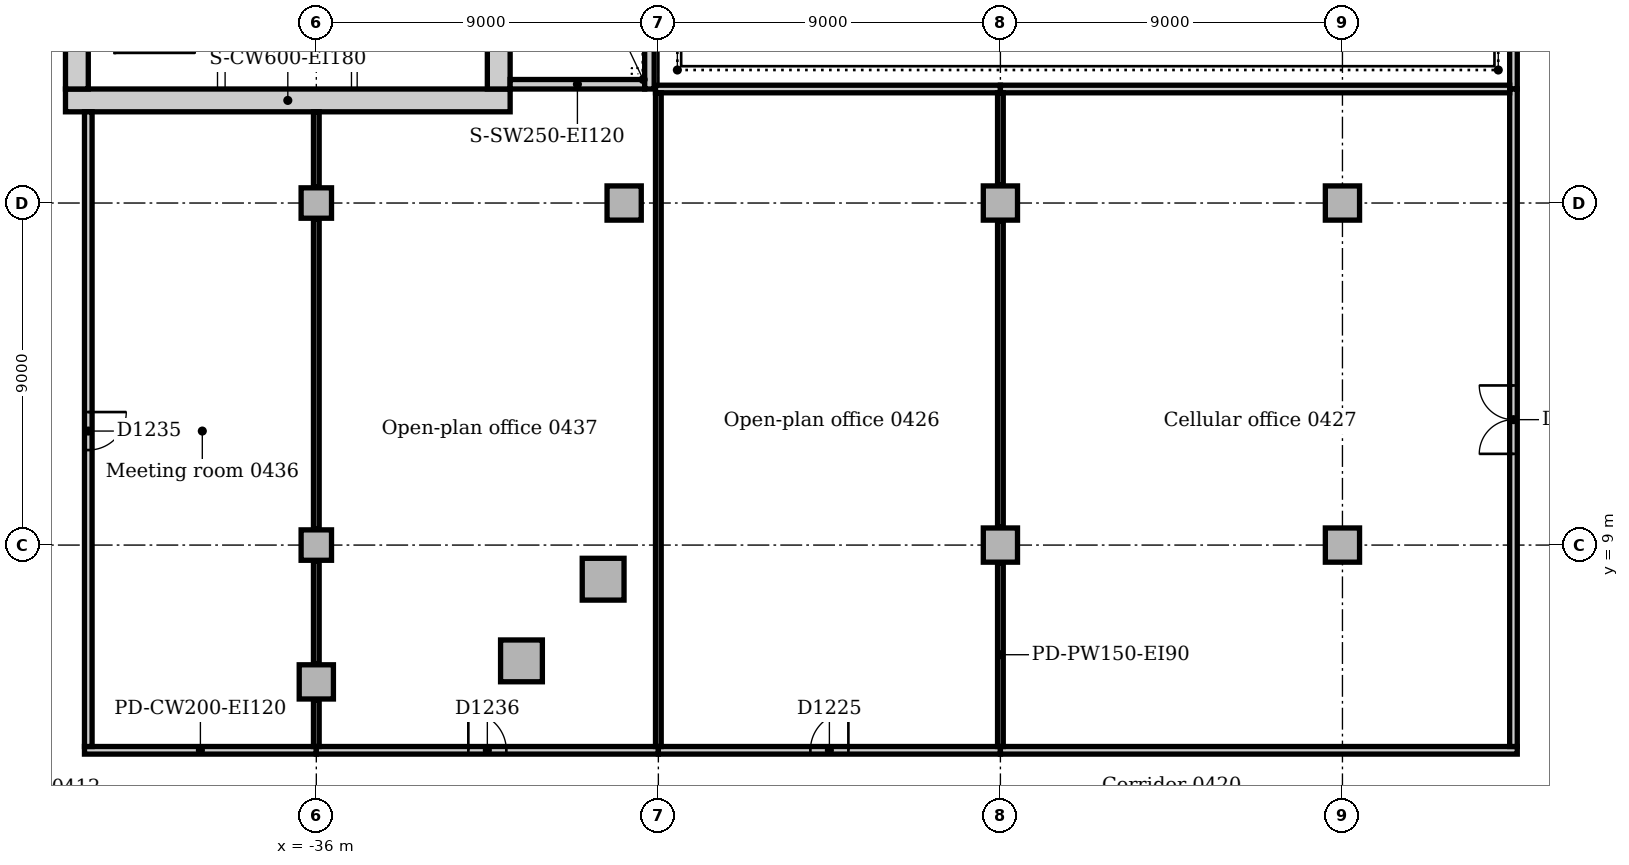
"""IFC4 building model, lengths in metres.
Left out: names, types, materials, properties, quantities, classifications, styles, units other than length and angle.
Written with IfcOpenShell. Run it as: python <this file> out.ifc"""

import sys

from ifc_helpers import new_model, si_unit, direction, frame, frame_2d, origin, origin_2d, place, context, subcontext, project, spatial, rectangle, extrude, element, fill, save


model = new_model("IFC4")
c1 = context("Model", 3, precision=1e-05, world=origin(), true_north=direction((0.0, 1.0)))
c2 = subcontext(c1, "Body", "Model", "MODEL_VIEW")
j1 = project(units=[si_unit("LENGTHUNIT", "METRE"), si_unit("PLANEANGLEUNIT", "RADIAN")], contexts=[c1])
p1 = place(None, origin())
s1 = spatial("IfcSite", under=j1, at=p1, CompositionType="ELEMENT")
p2 = place(p1, origin())
s2 = spatial("IfcBuilding", under=s1, at=p2, CompositionType="ELEMENT")
p3 = place(p2, frame((0.0, 0.0, 21.0)))
s3 = spatial("IfcBuildingStorey", under=s2, at=p3, CompositionType="ELEMENT", Elevation=21.0)
p4 = place(p3, frame((-42.6, 20.7, 0.0), z_axis=(0.0, 0.0, 1.0), x_axis=(1.0, 0.0, 0.0)))
e1 = element("IfcWall", 1, at=p4, inside=s3, PredefinedType="SOLIDWALL", context=c2, shape_type="SweptSolid", body=[
    extrude(rectangle(XDim=11.7, YDim=0.6, at=frame_2d((5.85, 0.0))), origin(), (0.0, 0.0, 1.0), 5.0),
])
p5 = place(p3, frame((-31.2, 21.0, 0.0), z_axis=(0.0, 0.0, 1.0), x_axis=(0.0, 1.0, 0.0)))
e2 = element("IfcWall", 2, at=p5, inside=s3, PredefinedType="SOLIDWALL", context=c2, shape_type="SweptSolid", body=[
    extrude(rectangle(XDim=9.5, YDim=0.6, at=frame_2d((4.75, 0.0))), origin(), (0.0, 0.0, 1.0), 5.0),
])
p6 = place(p5, frame((5.25, 0.0, 0.0)))
e3 = element("IfcOpeningElement", 3, at=p6, cuts=e2, PredefinedType="OPENING", context=c2, shape_type="SweptSolid", body=[
    extrude(rectangle(XDim=1.0, YDim=2.1, at=frame_2d((0.5, 1.05))), frame((0.0, 0.31, 0.0), z_axis=(0.0, -1.0, 0.0), x_axis=(1.0, 0.0, 0.0)), (0.0, 0.0, 1.0), 0.62),
])
p7 = place(p3, frame((-42.3, 30.5, 0.0), z_axis=(0.0, 0.0, 1.0), x_axis=(0.0, -1.0, 0.0)))
e4 = element("IfcWall", 4, at=p7, inside=s3, PredefinedType="SOLIDWALL", context=c2, shape_type="SweptSolid", body=[
    extrude(rectangle(XDim=9.5, YDim=0.6, at=frame_2d((4.75, 0.0))), origin(), (0.0, 0.0, 1.0), 5.0),
])
p8 = place(p7, frame((3.85, 0.0, 0.0)))
e5 = element("IfcOpeningElement", 5, at=p8, cuts=e4, PredefinedType="OPENING", context=c2, shape_type="SweptSolid", body=[
    extrude(rectangle(XDim=1.8, YDim=2.1, at=frame_2d((0.9, 1.05))), frame((0.0, 0.31, 0.0), z_axis=(0.0, -1.0, 0.0), x_axis=(1.0, 0.0, 0.0)), (0.0, 0.0, 1.0), 0.62),
])
p9 = place(p3, frame((-30.9, 21.125, 0.0), z_axis=(0.0, 0.0, 1.0), x_axis=(1.0, 0.0, 0.0)))
e6 = element("IfcWall", 6, at=p9, inside=s3, PredefinedType="SOLIDWALL", context=c2, shape_type="SweptSolid", body=[
    extrude(rectangle(XDim=3.54, YDim=0.25, at=frame_2d((1.77, 0.0))), origin(), (0.0, 0.0, 1.0), 5.0),
])
p10 = place(p3, frame((-27.235, 21.0, 0.0), z_axis=(0.0, 0.0, 1.0), x_axis=(0.0, 1.0, 0.0)))
e7 = element("IfcWall", 7, at=p10, inside=s3, PredefinedType="SOLIDWALL", context=c2, shape_type="SweptSolid", body=[
    extrude(rectangle(XDim=6.65, YDim=0.25, at=frame_2d((3.325, 0.0))), origin(), (0.0, 0.0, 1.0), 5.0),
])
for number, where, z_axis, x_axis in (
    (8, (-30.602, 5.953, 0.0), (0.0, 0.0, 1.0), (1.0, 0.0, 0.0)),
    (9, (-28.453, 8.102, 0.0), (0.0, 0.0, 1.0), (1.0, 0.0, 0.0)),
):
    element("IfcColumn", number, at=place(p3, frame(where, z_axis=z_axis, x_axis=x_axis)), inside=s3, PredefinedType="COLUMN", context=c2, shape_type="SweptSolid", body=[
        extrude(rectangle(XDim=1.1, YDim=1.1, at=origin_2d()), origin(), (0.0, 0.0, 1.0), 4.85),
    ])
for number, where, z_axis, x_axis in (
    (10, (-36.0, 5.4, 0.0), (0.0, 0.0, 1.0), (1.0, 0.0, 0.0)),
    (11, (-27.9, 18.0, 0.0), (0.0, 0.0, 1.0), (1.0, 0.0, 0.0)),
):
    element("IfcColumn", number, at=place(p3, frame(where, z_axis=z_axis, x_axis=x_axis)), inside=s3, PredefinedType="COLUMN", context=c2, shape_type="SweptSolid", body=[
        extrude(rectangle(XDim=0.9, YDim=0.9, at=origin_2d()), origin(), (0.0, 0.0, 1.0), 4.85),
    ])
for number, where, z_axis, x_axis in (
    (12, (-36.0, 9.0, 0.0), (0.0, 0.0, 1.0), (1.0, 0.0, 0.0)),
    (13, (-36.0, 18.0, 0.0), (0.0, 0.0, 1.0), (1.0, 0.0, 0.0)),
):
    element("IfcColumn", number, at=place(p3, frame(where, z_axis=z_axis, x_axis=x_axis)), inside=s3, PredefinedType="COLUMN", context=c2, shape_type="SweptSolid", body=[
        extrude(rectangle(XDim=0.8, YDim=0.8, at=origin_2d()), origin(), (0.0, 0.0, 1.0), 4.85),
    ])
for number, where, z_axis, x_axis in (
    (14, (-18.0, 9.0, 0.0), (0.0, 0.0, 1.0), (1.0, 0.0, 0.0)),
    (15, (-18.0, 18.0, 0.0), (0.0, 0.0, 1.0), (1.0, 0.0, 0.0)),
    (16, (-9.0, 9.0, 0.0), (0.0, 0.0, 1.0), (1.0, 0.0, 0.0)),
    (17, (-9.0, 18.0, 0.0), (0.0, 0.0, 1.0), (1.0, 0.0, 0.0)),
):
    element("IfcColumn", number, at=place(p3, frame(where, z_axis=z_axis, x_axis=x_axis)), inside=s3, PredefinedType="COLUMN", context=c2, shape_type="SweptSolid", body=[
        extrude(rectangle(XDim=0.9, YDim=0.9, at=origin_2d()), origin(), (0.0, 0.0, 1.0), 4.7),
    ])
p11 = place(p3, frame((-42.1, 3.6, 0.0), z_axis=(0.0, 0.0, 1.0), x_axis=(1.0, 0.0, 0.0)))
e18 = element("IfcWall", 18, at=p11, inside=s3, PredefinedType="PARTITIONING", context=c2, shape_type="SweptSolid", body=[
    extrude(rectangle(XDim=6.1, YDim=0.2, at=frame_2d((3.05, 0.0))), origin(), (0.0, 0.0, 1.0), 4.7),
])
p12 = place(p3, frame((-36.0, 3.6, 0.0), z_axis=(0.0, 0.0, 1.0), x_axis=(1.0, 0.0, 0.0)))
e19 = element("IfcWall", 19, at=p12, inside=s3, PredefinedType="PARTITIONING", context=c2, shape_type="SweptSolid", body=[
    extrude(rectangle(XDim=9.0, YDim=0.2, at=frame_2d((4.5, 0.0))), origin(), (0.0, 0.0, 1.0), 4.7),
])
p13 = place(p12, frame((4.0, 0.0, 0.0)))
e20 = element("IfcOpeningElement", 20, at=p13, cuts=e19, PredefinedType="OPENING", context=c2, shape_type="SweptSolid", body=[
    extrude(rectangle(XDim=1.0, YDim=2.1, at=frame_2d((0.5, 1.05))), frame((0.0, 0.11, 0.0), z_axis=(0.0, -1.0, 0.0), x_axis=(1.0, 0.0, 0.0)), (0.0, 0.0, 1.0), 0.22),
])
p14 = place(p3, frame((-42.0, 3.7, 0.0), z_axis=(0.0, 0.0, 1.0), x_axis=(0.0, 1.0, 0.0)))
e21 = element("IfcWall", 21, at=p14, inside=s3, PredefinedType="PARTITIONING", context=c2, shape_type="SweptSolid", body=[
    extrude(rectangle(XDim=16.7, YDim=0.2, at=frame_2d((8.35, 0.0))), origin(), (0.0, 0.0, 1.0), 4.7),
])
p15 = place(p14, frame((7.8, 0.0, 0.0)))
e22 = element("IfcOpeningElement", 22, at=p15, cuts=e21, PredefinedType="OPENING", context=c2, shape_type="SweptSolid", body=[
    extrude(rectangle(XDim=1.0, YDim=2.1, at=frame_2d((0.5, 1.05))), frame((0.0, 0.11, 0.0), z_axis=(0.0, -1.0, 0.0), x_axis=(1.0, 0.0, 0.0)), (0.0, 0.0, 1.0), 0.22),
])
p16 = place(p3, frame((-27.0, 3.6, 0.0), z_axis=(0.0, 0.0, 1.0), x_axis=(1.0, 0.0, 0.0)))
e23 = element("IfcWall", 23, at=p16, inside=s3, PredefinedType="PARTITIONING", context=c2, shape_type="SweptSolid", body=[
    extrude(rectangle(XDim=9.0, YDim=0.2, at=frame_2d((4.5, 0.0))), origin(), (0.0, 0.0, 1.0), 4.7),
])
p17 = place(p16, frame((4.0, 0.0, 0.0)))
e24 = element("IfcOpeningElement", 24, at=p17, cuts=e23, PredefinedType="OPENING", context=c2, shape_type="SweptSolid", body=[
    extrude(rectangle(XDim=1.0, YDim=2.1, at=frame_2d((0.5, 1.05))), frame((0.0, 0.11, 0.0), z_axis=(0.0, -1.0, 0.0), x_axis=(1.0, 0.0, 0.0)), (0.0, 0.0, 1.0), 0.22),
])
p18 = place(p3, frame((-18.0, 3.6, 0.0), z_axis=(0.0, 0.0, 1.0), x_axis=(1.0, 0.0, 0.0)))
e25 = element("IfcWall", 25, at=p18, inside=s3, PredefinedType="PARTITIONING", context=c2, shape_type="SweptSolid", body=[
    extrude(rectangle(XDim=13.6, YDim=0.2, at=frame_2d((6.8, 0.0))), origin(), (0.0, 0.0, 1.0), 4.7),
])
p19 = place(p3, frame((-4.5, 21.0, 0.0), z_axis=(0.0, 0.0, 1.0), x_axis=(0.0, 1.0, 0.0)))
e26 = element("IfcWall", 26, at=p19, inside=s3, PredefinedType="PARTITIONING", context=c2, shape_type="SweptSolid", body=[
    extrude(rectangle(XDim=24.0, YDim=0.2, at=frame_2d((12.0, 0.0))), origin(), (0.0, 0.0, 1.0), 4.7),
])
p20 = place(p3, frame((-4.5, 3.7, 0.0), z_axis=(0.0, 0.0, 1.0), x_axis=(0.0, 1.0, 0.0)))
e27 = element("IfcWall", 27, at=p20, inside=s3, PredefinedType="PARTITIONING", context=c2, shape_type="SweptSolid", body=[
    extrude(rectangle(XDim=17.3, YDim=0.2, at=frame_2d((8.65, 0.0))), origin(), (0.0, 0.0, 1.0), 4.7),
])
p21 = place(p20, frame((7.7, 0.0, 0.0)))
e28 = element("IfcOpeningElement", 28, at=p21, cuts=e27, PredefinedType="OPENING", context=c2, shape_type="SweptSolid", body=[
    extrude(rectangle(XDim=1.8, YDim=2.1, at=frame_2d((0.9, 1.05))), frame((0.0, 0.11, 0.0), z_axis=(0.0, -1.0, 0.0), x_axis=(1.0, 0.0, 0.0)), (0.0, 0.0, 1.0), 0.22),
])
p22 = place(p3, frame((-27.075, 21.0, 0.0), z_axis=(0.0, 0.0, 1.0), x_axis=(1.0, 0.0, 0.0)))
e29 = element("IfcWall", 29, at=p22, inside=s3, PredefinedType="PARTITIONING", context=c2, shape_type="SweptSolid", body=[
    extrude(rectangle(XDim=9.075, YDim=0.2, at=frame_2d((4.537, 0.0))), origin(), (0.0, 0.0, 1.0), 4.7),
])
p23 = place(p3, frame((-18.0, 21.0, 0.0), z_axis=(0.0, 0.0, 1.0), x_axis=(1.0, 0.0, 0.0)))
e30 = element("IfcWall", 30, at=p23, inside=s3, PredefinedType="PARTITIONING", context=c2, shape_type="SweptSolid", body=[
    extrude(rectangle(XDim=13.4, YDim=0.2, at=frame_2d((6.7, 0.0))), origin(), (0.0, 0.0, 1.0), 4.7),
])
p24 = place(p3, frame((-18.0, 3.7, 0.0), z_axis=(0.0, 0.0, 1.0), x_axis=(0.0, 1.0, 0.0)))
e31 = element("IfcWall", 31, at=p24, inside=s3, PredefinedType="PARTITIONING", context=c2, shape_type="SweptSolid", body=[
    extrude(rectangle(XDim=4.83, YDim=0.15, at=frame_2d((2.415, 0.0))), origin(), (0.0, 0.0, 1.0), 4.7),
])
p25 = place(p3, frame((-18.0, 9.47, 0.0), z_axis=(0.0, 0.0, 1.0), x_axis=(0.0, 1.0, 0.0)))
e32 = element("IfcWall", 32, at=p25, inside=s3, PredefinedType="PARTITIONING", context=c2, shape_type="SweptSolid", body=[
    extrude(rectangle(XDim=8.06, YDim=0.15, at=frame_2d((4.03, 0.0))), origin(), (0.0, 0.0, 1.0), 4.7),
])
p26 = place(p3, frame((-18.0, 18.47, 0.0), z_axis=(0.0, 0.0, 1.0), x_axis=(0.0, 1.0, 0.0)))
e33 = element("IfcWall", 33, at=p26, inside=s3, PredefinedType="PARTITIONING", context=c2, shape_type="SweptSolid", body=[
    extrude(rectangle(XDim=2.43, YDim=0.15, at=frame_2d((1.215, 0.0))), origin(), (0.0, 0.0, 1.0), 4.7),
])
p27 = place(p3, frame((-27.0, 3.7, 0.0), z_axis=(0.0, 0.0, 1.0), x_axis=(0.0, 1.0, 0.0)))
e34 = element("IfcWall", 34, at=p27, inside=s3, PredefinedType="PARTITIONING", context=c2, shape_type="SweptSolid", body=[
    extrude(rectangle(XDim=17.2, YDim=0.15, at=frame_2d((8.6, 0.0))), origin(), (0.0, 0.0, 1.0), 4.7),
])
p28 = place(p3, frame((-36.0, 3.7, 0.0), z_axis=(0.0, 0.0, 1.0), x_axis=(0.0, 1.0, 0.0)))
e35 = element("IfcWall", 35, at=p28, inside=s3, PredefinedType="PARTITIONING", context=c2, shape_type="SweptSolid", body=[
    extrude(rectangle(XDim=1.23, YDim=0.15, at=frame_2d((0.615, 0.0))), origin(), (0.0, 0.0, 1.0), 4.7),
])
p29 = place(p3, frame((-36.0, 5.87, 0.0), z_axis=(0.0, 0.0, 1.0), x_axis=(0.0, 1.0, 0.0)))
e36 = element("IfcWall", 36, at=p29, inside=s3, PredefinedType="PARTITIONING", context=c2, shape_type="SweptSolid", body=[
    extrude(rectangle(XDim=2.71, YDim=0.15, at=frame_2d((1.355, 0.0))), origin(), (0.0, 0.0, 1.0), 4.652),
])
p30 = place(p3, frame((-36.0, 9.42, 0.0), z_axis=(0.0, 0.0, 1.0), x_axis=(0.0, 1.0, 0.0)))
e37 = element("IfcWall", 37, at=p30, inside=s3, PredefinedType="PARTITIONING", context=c2, shape_type="SweptSolid", body=[
    extrude(rectangle(XDim=8.16, YDim=0.15, at=frame_2d((4.08, 0.0))), origin(), (0.0, 0.0, 1.0), 4.158),
])
p31 = place(p3, frame((-36.0, 18.42, 0.0), z_axis=(0.0, 0.0, 1.0), x_axis=(0.0, 1.0, 0.0)))
e38 = element("IfcWall", 38, at=p31, inside=s3, PredefinedType="PARTITIONING", context=c2, shape_type="SweptSolid", body=[
    extrude(rectangle(XDim=1.98, YDim=0.15, at=frame_2d((0.99, 0.0))), origin(), (0.0, 0.0, 1.0), 4.652),
])
p32 = place(p3, frame((-38.5, 21.0, 0.0), z_axis=(0.0, 0.0, 1.0), x_axis=(0.0, 1.0, 0.0)))
e39 = element("IfcWall", 39, at=p32, inside=s3, PredefinedType="SOLIDWALL", context=c2, shape_type="SweptSolid", body=[
    extrude(rectangle(XDim=3.1, YDim=0.2, at=frame_2d((1.55, 0.0))), origin(), (0.0, 0.0, 1.0), 5.0),
])
p33 = place(p3, frame((-35.0, 21.0, 0.0), z_axis=(0.0, 0.0, 1.0), x_axis=(0.0, 1.0, 0.0)))
e40 = element("IfcWall", 40, at=p33, inside=s3, PredefinedType="SOLIDWALL", context=c2, shape_type="SweptSolid", body=[
    extrude(rectangle(XDim=2.9, YDim=0.15, at=frame_2d((1.45, 0.0))), origin(), (0.0, 0.0, 1.0), 5.0),
])
p34 = place(p17, origin())
e41 = element("IfcDoor", 41, at=p34, inside=s3, OperationType="SINGLE_SWING_RIGHT", PredefinedType="DOOR", context=c2, shape_type="SweptSolid", body=[
    extrude(rectangle(XDim=1.0, YDim=2.1, at=frame_2d((0.5, 1.05))), frame((0.0, 0.025, 0.0), z_axis=(0.0, -1.0, 0.0), x_axis=(1.0, 0.0, 0.0)), (0.0, 0.0, 1.0), 0.05),
])
fill(e24, e41)
p35 = place(p21, origin())
e42 = element("IfcDoor", 42, at=p35, inside=s3, OperationType="DOUBLE_DOOR_SINGLE_SWING", PredefinedType="DOOR", context=c2, shape_type="SweptSolid", body=[
    extrude(rectangle(XDim=1.8, YDim=2.1, at=frame_2d((0.9, 1.05))), frame((0.0, 0.025, 0.0), z_axis=(0.0, -1.0, 0.0), x_axis=(1.0, 0.0, 0.0)), (0.0, 0.0, 1.0), 0.05),
])
fill(e28, e42)
p36 = place(p15, frame((1.0, 0.0, 0.0), z_axis=(0.0, 0.0, 1.0), x_axis=(-1.0, 0.0, 0.0)))
e43 = element("IfcDoor", 43, at=p36, inside=s3, OperationType="SINGLE_SWING_LEFT", PredefinedType="DOOR", context=c2, shape_type="SweptSolid", body=[
    extrude(rectangle(XDim=1.0, YDim=2.1, at=frame_2d((0.5, 1.05))), frame((0.0, 0.025, 0.0), z_axis=(0.0, -1.0, 0.0), x_axis=(1.0, 0.0, 0.0)), (0.0, 0.0, 1.0), 0.05),
])
fill(e22, e43)
p37 = place(p13, origin())
e44 = element("IfcDoor", 44, at=p37, inside=s3, OperationType="SINGLE_SWING_LEFT", PredefinedType="DOOR", context=c2, shape_type="SweptSolid", body=[
    extrude(rectangle(XDim=1.0, YDim=2.1, at=frame_2d((0.5, 1.05))), frame((0.0, 0.025, 0.0), z_axis=(0.0, -1.0, 0.0), x_axis=(1.0, 0.0, 0.0)), (0.0, 0.0, 1.0), 0.05),
])
fill(e20, e44)
save(model, sys.argv[1])
